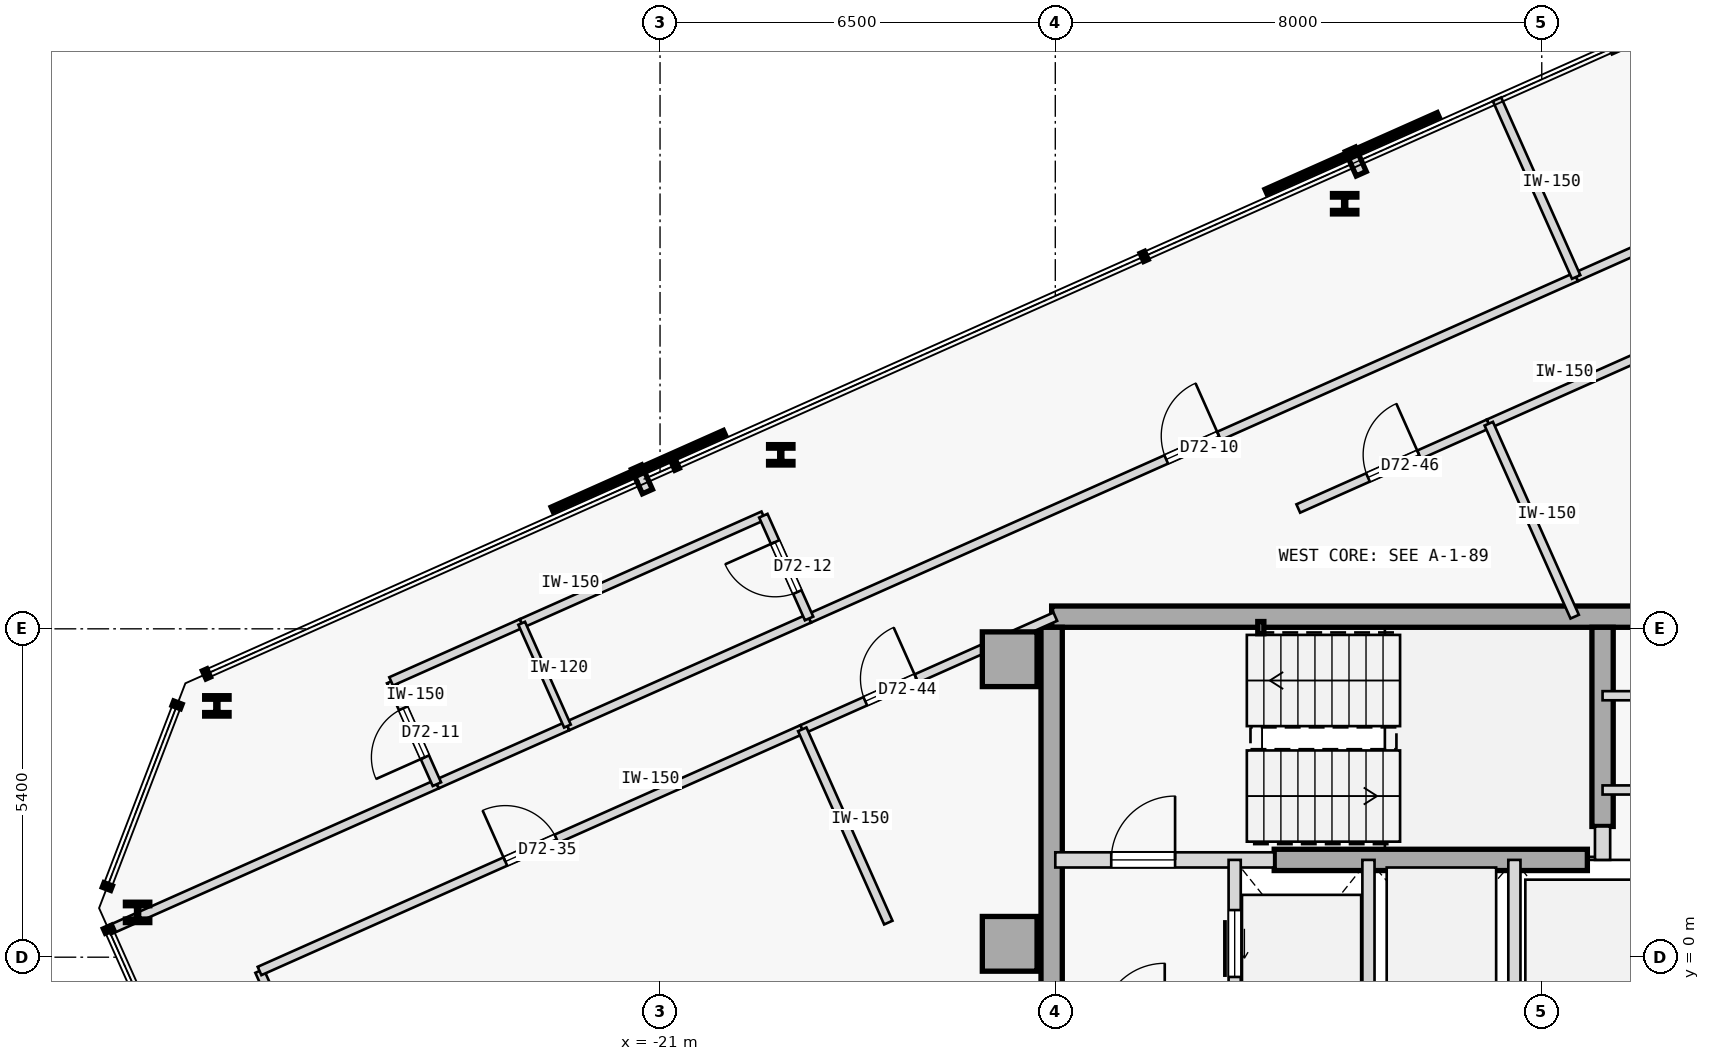
"""IFC4 building model, lengths in metres.
Left out: names, types, materials, properties, quantities, classifications, styles, units other than length and angle.
Written with IfcOpenShell. Run it as: python <this file> out.ifc"""

import sys

from ifc_helpers import new_model, si_unit, direction, frame, frame_2d, origin, origin_2d, place, context, subcontext, project, spatial, rectangle, hollow_rectangle, i_section, extrude, element, fill, save


model = new_model("IFC4")
c1 = context("Model", 3, precision=1e-05, world=origin(), true_north=direction((0.0, 1.0)))
c2 = subcontext(c1, "Body", "Model", "MODEL_VIEW")
j1 = project(units=[si_unit("LENGTHUNIT", "METRE"), si_unit("PLANEANGLEUNIT", "RADIAN")], contexts=[c1])
p1 = place(None, origin())
s1 = spatial("IfcSite", under=j1, at=p1, CompositionType="ELEMENT")
p2 = place(p1, origin())
s2 = spatial("IfcBuilding", under=s1, at=p2, CompositionType="ELEMENT")
p3 = place(p2, frame((0.0, 0.0, 268.9)))
s3 = spatial("IfcBuildingStorey", under=s2, at=p3, CompositionType="ELEMENT", Elevation=268.9)
for number, where, z_axis, x_axis in (
    (1, (-15.25, 4.9, 0.0), (0.0, 0.0, 1.0), (1.0, 0.0, 0.0)),
    (2, (-15.25, 0.22, 0.0), (0.0, 0.0, 1.0), (1.0, 0.0, 0.0)),
):
    element("IfcColumn", number, at=place(p3, frame(where, z_axis=z_axis, x_axis=x_axis)), inside=s3, PredefinedType="COLUMN", context=c2, shape_type="SweptSolid", body=[
        extrude(rectangle(XDim=0.9, YDim=0.9, at=origin_2d()), origin(), (0.0, 0.0, 1.0), 3.35),
    ])
p4 = place(p3, frame((-14.56, 5.6, 0.0), z_axis=(0.0, 0.0, 1.0), x_axis=(1.0, 0.0, 0.0)))
e3 = element("IfcWall", 3, at=p4, inside=s3, PredefinedType="SHEAR", context=c2, shape_type="SweptSolid", body=[
    extrude(rectangle(XDim=11.41, YDim=0.35, at=frame_2d((5.705, 0.0))), origin(), (0.0, 0.0, 1.0), 3.125),
])
p5 = place(p3, frame((-14.56, -5.425, 0.0), z_axis=(0.0, 0.0, 1.0), x_axis=(0.0, 1.0, 0.0)))
e4 = element("IfcWall", 4, at=p5, inside=s3, PredefinedType="SHEAR", context=c2, shape_type="SweptSolid", body=[
    extrude(rectangle(XDim=10.85, YDim=0.35, at=frame_2d((5.425, 0.0))), origin(), (0.0, 0.0, 1.0), 3.125),
])
p6 = place(p3, frame((-5.5, 2.15, 0.0), z_axis=(0.0, 0.0, 1.0), x_axis=(0.0, 1.0, 0.0)))
e5 = element("IfcWall", 5, at=p6, inside=s3, PredefinedType="SHEAR", context=c2, shape_type="SweptSolid", body=[
    extrude(rectangle(XDim=3.275, YDim=0.35, at=frame_2d((1.638, 0.0))), origin(), (0.0, 0.0, 1.0), 3.125),
])
p7 = place(p3, frame((-10.9, 1.6, 0.0), z_axis=(0.0, 0.0, 1.0), x_axis=(1.0, 0.0, 0.0)))
e6 = element("IfcWall", 6, at=p7, inside=s3, PredefinedType="SHEAR", context=c2, shape_type="SweptSolid", body=[
    extrude(rectangle(XDim=5.15, YDim=0.35, at=frame_2d((2.575, 0.0))), origin(), (0.0, 0.0, 1.0), 3.125),
])
p8 = place(p3, frame((-11.12, 5.42, 0.0), z_axis=(0.0, 0.0, 1.0), x_axis=(1.0, 0.0, 0.0)))
e7 = element("IfcColumn", 7, at=p8, inside=s3, PredefinedType="COLUMN", context=c2, shape_type="SweptSolid", body=[
    extrude(hollow_rectangle(XDim=0.1, YDim=0.2, WallThickness=0.008, at=origin_2d()), origin(), (0.0, 0.0, 1.0), 3.35),
])
for number, where, z_axis, x_axis in (
    (8, (-9.741, 12.39, 0.0), (0.0, 0.0, 1.0), (1.0, 0.0, 0.0)),
    (9, (-19.015, 8.262, 0.0), (0.0, 0.0, 1.0), (1.0, 0.0, 0.0)),
    (10, (-28.288, 4.133, 0.0), (0.0, 0.0, 1.0), (1.0, 0.0, 0.0)),
    (11, (-29.592, 0.737, 0.0), (0.0, 0.0, 1.0), (1.0, 0.0, 0.0)),
):
    element("IfcColumn", number, at=place(p3, frame(where, z_axis=z_axis, x_axis=x_axis)), inside=s3, PredefinedType="COLUMN", context=c2, shape_type="SweptSolid", body=[
        extrude(i_section(OverallWidth=0.401, OverallDepth=0.335, WebThickness=0.036, FlangeThickness=0.058, FilletRadius=0.015, at=origin_2d()), origin(), (0.0, 0.0, 1.0), 3.35),
    ])
p9 = place(p3, frame((-14.5, 1.6, 0.0), z_axis=(0.0, 0.0, 1.0), x_axis=(1.0, 0.0, 0.0)))
e12 = element("IfcWall", 12, at=p9, inside=s3, PredefinedType="STANDARD", context=c2, shape_type="SweptSolid", body=[
    extrude(rectangle(XDim=3.6, YDim=0.25, at=frame_2d((1.8, 0.0))), origin(), (0.0, 0.0, 1.0), 3.125),
])
p10 = place(p9, frame((0.92, 0.0, 0.0)))
e13 = element("IfcOpeningElement", 13, at=p10, cuts=e12, PredefinedType="OPENING", context=c2, shape_type="SweptSolid", body=[
    extrude(rectangle(XDim=1.05, YDim=2.15, at=frame_2d((0.525, 1.075))), frame((0.0, 0.135, 0.0), z_axis=(0.0, -1.0, 0.0), x_axis=(1.0, 0.0, 0.0)), (0.0, 0.0, 1.0), 0.27),
])
p11 = place(p3, frame((-5.5, 1.6, 0.0), z_axis=(0.0, 0.0, 1.0), x_axis=(0.0, 1.0, 0.0)))
e14 = element("IfcWall", 14, at=p11, inside=s3, PredefinedType="STANDARD", context=c2, shape_type="SweptSolid", body=[
    extrude(rectangle(XDim=0.55, YDim=0.25, at=frame_2d((0.275, 0.0))), origin(), (0.0, 0.0, 1.0), 3.125),
])
p12 = place(p3, frame((-11.55, -1.15, 0.0), z_axis=(0.0, 0.0, 1.0), x_axis=(0.0, 1.0, 0.0)))
e15 = element("IfcWall", 15, at=p12, inside=s3, PredefinedType="STANDARD", context=c2, shape_type="SweptSolid", body=[
    extrude(rectangle(XDim=2.75, YDim=0.2, at=frame_2d((1.375, 0.0))), origin(), (0.0, 0.0, 1.0), 3.125),
])
p13 = place(p12, frame((0.825, 0.0, 0.0)))
e16 = element("IfcOpeningElement", 16, at=p13, cuts=e15, PredefinedType="OPENING", context=c2, shape_type="SweptSolid", body=[
    extrude(rectangle(XDim=1.1, YDim=2.15, at=frame_2d((0.55, 1.075))), frame((0.0, 0.11, 0.0), z_axis=(0.0, -1.0, 0.0), x_axis=(1.0, 0.0, 0.0)), (0.0, 0.0, 1.0), 0.22),
])
for number, where, z_axis, x_axis in (
    (17, (-9.35, -1.15, 0.0), (0.0, 0.0, 1.0), (0.0, 1.0, 0.0)),
    (18, (-6.95, -1.15, 0.0), (0.0, 0.0, 1.0), (0.0, 1.0, 0.0)),
):
    element("IfcWall", number, at=place(p3, frame(where, z_axis=z_axis, x_axis=x_axis)), inside=s3, PredefinedType="STANDARD", context=c2, shape_type="SweptSolid", body=[
        extrude(rectangle(XDim=2.75, YDim=0.2, at=frame_2d((1.375, 0.0))), origin(), (0.0, 0.0, 1.0), 3.125),
    ])
for number, where, z_axis, x_axis in (
    (19, (-5.5, 4.3, 0.0), (0.0, 0.0, 1.0), (1.0, 0.0, 0.0)),
    (20, (-5.5, 2.75, 0.0), (0.0, 0.0, 1.0), (1.0, 0.0, 0.0)),
):
    element("IfcWall", number, at=place(p3, frame(where, z_axis=z_axis, x_axis=x_axis)), inside=s3, PredefinedType="PARTITIONING", context=c2, shape_type="SweptSolid", body=[
        extrude(rectangle(XDim=1.8, YDim=0.15, at=frame_2d((0.9, 0.0))), origin(), (0.0, 0.0, 1.0), 3.125),
    ])
p14 = place(p3, frame((-30.063, 0.444, 0.0), z_axis=(0.0, 0.0, 1.0), x_axis=(0.913545336501, 0.406736915165, 0.0)))
e21 = element("IfcWall", 21, at=p14, inside=s3, PredefinedType="PARTITIONING", context=c2, shape_type="SweptSolid", body=[
    extrude(rectangle(XDim=5.904, YDim=0.15, at=frame_2d((2.952, 0.0))), origin(), (0.0, 0.0, 1.0), 3.125),
])
p15 = place(p3, frame((-18.549, 5.57, 0.0), z_axis=(0.0, 0.0, 1.0), x_axis=(0.913545955058, 0.40673552586, 0.0)))
e22 = element("IfcWall", 22, at=p15, inside=s3, PredefinedType="PARTITIONING", context=c2, shape_type="SweptSolid", body=[
    extrude(rectangle(XDim=13.808, YDim=0.15, at=frame_2d((6.904, 0.0))), origin(), (0.0, 0.0, 1.0), 3.125),
])
p16 = place(p15, frame((6.429, 0.0, 0.0)))
e23 = element("IfcOpeningElement", 23, at=p16, cuts=e22, PredefinedType="OPENING", context=c2, shape_type="SweptSolid", body=[
    extrude(rectangle(XDim=0.95, YDim=2.15, at=frame_2d((0.475, 1.075))), frame((0.0, 0.085, 0.0), z_axis=(0.0, -1.0, 0.0), x_axis=(1.0, 0.0, 0.0)), (0.0, 0.0, 1.0), 0.17),
])
p17 = place(p3, frame((-24.67, 2.845, 0.0), z_axis=(0.0, 0.0, 1.0), x_axis=(0.913541436194, 0.406745675276, 0.0)))
e24 = element("IfcWall", 24, at=p17, inside=s3, PredefinedType="PARTITIONING", context=c2, shape_type="SweptSolid", body=[
    extrude(rectangle(XDim=2.35, YDim=0.15, at=frame_2d((1.175, 0.0))), origin(), (0.0, 0.0, 1.0), 3.125),
])
p18 = place(p3, frame((-22.523, 3.801, 0.0), z_axis=(0.0, 0.0, 1.0), x_axis=(0.913545193015, 0.406737237438, 0.0)))
e25 = element("IfcWall", 25, at=p18, inside=s3, PredefinedType="PARTITIONING", context=c2, shape_type="SweptSolid", body=[
    extrude(rectangle(XDim=4.35, YDim=0.15, at=frame_2d((2.175, 0.0))), origin(), (0.0, 0.0, 1.0), 3.125),
])
p19 = place(p3, frame((-5.935, 11.187, 0.0), z_axis=(0.0, 0.0, 1.0), x_axis=(0.91354851465, 0.406729776856, 0.0)))
e26 = element("IfcWall", 26, at=p19, inside=s3, PredefinedType="PARTITIONING", context=c2, shape_type="SweptSolid", body=[
    extrude(rectangle(XDim=6.703, YDim=0.15, at=frame_2d((3.352, 0.0))), origin(), (0.0, 0.0, 1.0), 3.125),
])
p20 = place(p3, frame((-24.54, -7.068, 0.0), z_axis=(0.0, 0.0, 1.0), x_axis=(-0.406758457302, 0.913535745011, 0.0)))
e27 = element("IfcWall", 27, at=p20, inside=s3, PredefinedType="PARTITIONING", context=c2, shape_type="SweptSolid", body=[
    extrude(rectangle(XDim=7.489, YDim=0.15, at=frame_2d((3.744, 0.0))), origin(), (0.0, 0.0, 1.0), 3.125),
])
p21 = place(p3, frame((-27.586, -0.227, 0.0), z_axis=(0.0, 0.0, 1.0), x_axis=(0.913542396088, 0.40674351937, 0.0)))
e28 = element("IfcWall", 28, at=p21, inside=s3, PredefinedType="PARTITIONING", context=c2, shape_type="SweptSolid", body=[
    extrude(rectangle(XDim=9.77, YDim=0.15, at=frame_2d((4.885, 0.0))), origin(), (0.0, 0.0, 1.0), 3.125),
])
p22 = place(p21, frame((4.425, 0.0, 0.0)))
e29 = element("IfcOpeningElement", 29, at=p22, cuts=e28, PredefinedType="OPENING", context=c2, shape_type="SweptSolid", body=[
    extrude(rectangle(XDim=0.92, YDim=2.15, at=frame_2d((0.46, 1.075))), frame((0.0, 0.085, 0.0), z_axis=(0.0, -1.0, 0.0), x_axis=(1.0, 0.0, 0.0)), (0.0, 0.0, 1.0), 0.17),
])
p23 = place(p3, frame((-18.661, 3.747, 0.0), z_axis=(0.0, 0.0, 1.0), x_axis=(0.913535055583, 0.40676000568, 0.0)))
e30 = element("IfcWall", 30, at=p23, inside=s3, PredefinedType="PARTITIONING", context=c2, shape_type="SweptSolid", body=[
    extrude(rectangle(XDim=4.555, YDim=0.15, at=frame_2d((2.277, 0.0))), origin(), (0.0, 0.0, 1.0), 3.125),
])
p24 = place(p23, frame((1.134, 0.0, 0.0)))
e31 = element("IfcOpeningElement", 31, at=p24, cuts=e30, PredefinedType="OPENING", context=c2, shape_type="SweptSolid", body=[
    extrude(rectangle(XDim=0.92, YDim=2.15, at=frame_2d((0.46, 1.075))), frame((0.0, 0.085, 0.0), z_axis=(0.0, -1.0, 0.0), x_axis=(1.0, 0.0, 0.0)), (0.0, 0.0, 1.0), 0.17),
])
p25 = place(p3, frame((-10.504, 7.379, 0.0), z_axis=(0.0, 0.0, 1.0), x_axis=(0.913526514415, 0.406779187596, 0.0)))
e32 = element("IfcWall", 32, at=p25, inside=s3, PredefinedType="PARTITIONING", context=c2, shape_type="SweptSolid", body=[
    extrude(rectangle(XDim=3.429, YDim=0.15, at=frame_2d((1.714, 0.0))), origin(), (0.0, 0.0, 1.0), 3.125),
])
p26 = place(p25, frame((1.254, 0.0, 0.0)))
e33 = element("IfcOpeningElement", 33, at=p26, cuts=e32, PredefinedType="OPENING", context=c2, shape_type="SweptSolid", body=[
    extrude(rectangle(XDim=0.92, YDim=2.15, at=frame_2d((0.46, 1.075))), frame((0.0, 0.085, 0.0), z_axis=(0.0, -1.0, 0.0), x_axis=(1.0, 0.0, 0.0)), (0.0, 0.0, 1.0), 0.17),
])
p27 = place(p3, frame((-7.372, 8.774, 0.0), z_axis=(0.0, 0.0, 1.0), x_axis=(0.913563383118, 0.406696379412, 0.0)))
e34 = element("IfcWall", 34, at=p27, inside=s3, PredefinedType="PARTITIONING", context=c2, shape_type="SweptSolid", body=[
    extrude(rectangle(XDim=4.019, YDim=0.15, at=frame_2d((2.01, 0.0))), origin(), (0.0, 0.0, 1.0), 3.125),
])
p28 = place(p3, frame((-24.67, 2.845, 0.0), z_axis=(0.0, 0.0, 1.0), x_axis=(-0.406701600856, 0.913561058639, 0.0)))
e35 = element("IfcWall", 35, at=p28, inside=s3, PredefinedType="PARTITIONING", context=c2, shape_type="SweptSolid", body=[
    extrude(rectangle(XDim=1.85, YDim=0.15, at=frame_2d((0.925, 0.0))), origin(), (0.0, 0.0, 1.0), 3.125),
])
p29 = place(p28, frame((0.485, 0.0, 0.0)))
e36 = element("IfcOpeningElement", 36, at=p29, cuts=e35, PredefinedType="OPENING", context=c2, shape_type="SweptSolid", body=[
    extrude(rectangle(XDim=0.88, YDim=2.15, at=frame_2d((0.44, 1.075))), frame((0.0, 0.085, 0.0), z_axis=(0.0, -1.0, 0.0), x_axis=(1.0, 0.0, 0.0)), (0.0, 0.0, 1.0), 0.17),
])
p30 = place(p3, frame((-25.422, 4.535, 0.0), z_axis=(0.0, 0.0, 1.0), x_axis=(0.913541436194, 0.406745675276, 0.0)))
e37 = element("IfcWall", 37, at=p30, inside=s3, PredefinedType="PARTITIONING", context=c2, shape_type="SweptSolid", body=[
    extrude(rectangle(XDim=2.35, YDim=0.15, at=frame_2d((1.175, 0.0))), origin(), (0.0, 0.0, 1.0), 3.125),
])
p31 = place(p3, frame((-23.275, 5.491, 0.0), z_axis=(0.0, 0.0, 1.0), x_axis=(0.913545193015, 0.406737237438, 0.0)))
e38 = element("IfcWall", 38, at=p31, inside=s3, PredefinedType="PARTITIONING", context=c2, shape_type="SweptSolid", body=[
    extrude(rectangle(XDim=4.35, YDim=0.15, at=frame_2d((2.175, 0.0))), origin(), (0.0, 0.0, 1.0), 3.125),
])
p32 = place(p3, frame((-18.549, 5.57, 0.0), z_axis=(0.0, 0.0, 1.0), x_axis=(-0.406701600856, 0.913561058639, 0.0)))
e39 = element("IfcWall", 39, at=p32, inside=s3, PredefinedType="PARTITIONING", context=c2, shape_type="SweptSolid", body=[
    extrude(rectangle(XDim=1.85, YDim=0.15, at=frame_2d((0.925, 0.0))), origin(), (0.0, 0.0, 1.0), 3.125),
])
p33 = place(p32, frame((0.475, 0.0, 0.0)))
e40 = element("IfcOpeningElement", 40, at=p33, cuts=e39, PredefinedType="OPENING", context=c2, shape_type="SweptSolid", body=[
    extrude(rectangle(XDim=0.9, YDim=2.15, at=frame_2d((0.45, 1.075))), frame((0.0, 0.085, 0.0), z_axis=(0.0, -1.0, 0.0), x_axis=(1.0, 0.0, 0.0)), (0.0, 0.0, 1.0), 0.17),
])
p34 = place(p3, frame((-5.935, 11.187, 0.0), z_axis=(0.0, 0.0, 1.0), x_axis=(-0.406733350739, 0.913546923478, 0.0)))
e41 = element("IfcWall", 41, at=p34, inside=s3, PredefinedType="PARTITIONING", context=c2, shape_type="SweptSolid", body=[
    extrude(rectangle(XDim=3.198, YDim=0.15, at=frame_2d((1.599, 0.0))), origin(), (0.0, 0.0, 1.0), 3.125),
])
p35 = place(p3, frame((-22.523, 3.801, 0.0), z_axis=(0.0, 0.0, 1.0), x_axis=(-0.406701600856, 0.913561058639, 0.0)))
e42 = element("IfcWall", 42, at=p35, inside=s3, PredefinedType="PARTITIONING", context=c2, shape_type="SweptSolid", body=[
    extrude(rectangle(XDim=1.85, YDim=0.12, at=frame_2d((0.925, 0.0))), origin(), (0.0, 0.0, 1.0), 3.125),
])
p36 = place(p3, frame((-17.246, 0.569, 0.0), z_axis=(0.0, 0.0, 1.0), x_axis=(-0.40673740295, 0.913545119324, 0.0)))
e43 = element("IfcWall", 43, at=p36, inside=s3, PredefinedType="PARTITIONING", context=c2, shape_type="SweptSolid", body=[
    extrude(rectangle(XDim=3.479, YDim=0.15, at=frame_2d((1.74, 0.0))), origin(), (0.0, 0.0, 1.0), 3.125),
])
p37 = place(p3, frame((-5.958, 5.6, 0.0), z_axis=(0.0, 0.0, 1.0), x_axis=(-0.406738231884, 0.913544750258, 0.0)))
e44 = element("IfcWall", 44, at=p37, inside=s3, PredefinedType="PARTITIONING", context=c2, shape_type="SweptSolid", body=[
    extrude(rectangle(XDim=3.474, YDim=0.15, at=frame_2d((1.737, 0.0))), origin(), (0.0, 0.0, 1.0), 3.125),
])
p38 = place(p10, origin())
e45 = element("IfcDoor", 45, at=p38, inside=s3, OperationType="SINGLE_SWING_RIGHT", PredefinedType="DOOR", context=c2, shape_type="SweptSolid", body=[
    extrude(rectangle(XDim=1.05, YDim=2.15, at=frame_2d((0.525, 1.075))), frame((0.0, 0.025, 0.0), z_axis=(0.0, -1.0, 0.0), x_axis=(1.0, 0.0, 0.0)), (0.0, 0.0, 1.0), 0.05),
])
fill(e13, e45)
p39 = place(p13, origin())
e46 = element("IfcDoor", 46, at=p39, inside=s3, OperationType="SLIDING_TO_RIGHT", PredefinedType="DOOR", context=c2, shape_type="SweptSolid", body=[
    extrude(rectangle(XDim=1.1, YDim=2.15, at=frame_2d((0.55, 1.075))), frame((0.0, 0.025, 0.0), z_axis=(0.0, -1.0, 0.0), x_axis=(1.0, 0.0, 0.0)), (0.0, 0.0, 1.0), 0.05),
])
fill(e16, e46)
p40 = place(p16, origin())
e47 = element("IfcDoor", 47, at=p40, inside=s3, OperationType="SINGLE_SWING_RIGHT", PredefinedType="DOOR", context=c2, shape_type="SweptSolid", body=[
    extrude(rectangle(XDim=0.95, YDim=2.15, at=frame_2d((0.475, 1.075))), frame((0.0, 0.025, 0.0), z_axis=(0.0, -1.0, 0.0), x_axis=(1.0, 0.0, 0.0)), (0.0, 0.0, 1.0), 0.05),
])
fill(e23, e47)
p41 = place(p29, origin())
e48 = element("IfcDoor", 48, at=p41, inside=s3, OperationType="SINGLE_SWING_LEFT", PredefinedType="DOOR", context=c2, shape_type="SweptSolid", body=[
    extrude(rectangle(XDim=0.88, YDim=2.15, at=frame_2d((0.44, 1.075))), frame((0.0, 0.025, 0.0), z_axis=(0.0, -1.0, 0.0), x_axis=(1.0, 0.0, 0.0)), (0.0, 0.0, 1.0), 0.05),
])
fill(e36, e48)
p42 = place(p33, origin())
e49 = element("IfcDoor", 49, at=p42, inside=s3, OperationType="SINGLE_SWING_RIGHT", PredefinedType="DOOR", context=c2, shape_type="SweptSolid", body=[
    extrude(rectangle(XDim=0.9, YDim=2.15, at=frame_2d((0.45, 1.075))), frame((0.0, 0.025, 0.0), z_axis=(0.0, -1.0, 0.0), x_axis=(1.0, 0.0, 0.0)), (0.0, 0.0, 1.0), 0.05),
])
fill(e40, e49)
p43 = place(p22, origin())
e50 = element("IfcDoor", 50, at=p43, inside=s3, OperationType="SINGLE_SWING_LEFT", PredefinedType="DOOR", context=c2, shape_type="SweptSolid", body=[
    extrude(rectangle(XDim=0.92, YDim=2.15, at=frame_2d((0.46, 1.075))), frame((0.0, 0.025, 0.0), z_axis=(0.0, -1.0, 0.0), x_axis=(1.0, 0.0, 0.0)), (0.0, 0.0, 1.0), 0.05),
])
fill(e29, e50)
p44 = place(p24, origin())
e51 = element("IfcDoor", 51, at=p44, inside=s3, OperationType="SINGLE_SWING_RIGHT", PredefinedType="DOOR", context=c2, shape_type="SweptSolid", body=[
    extrude(rectangle(XDim=0.92, YDim=2.15, at=frame_2d((0.46, 1.075))), frame((0.0, 0.025, 0.0), z_axis=(0.0, -1.0, 0.0), x_axis=(1.0, 0.0, 0.0)), (0.0, 0.0, 1.0), 0.05),
])
fill(e31, e51)
p45 = place(p26, origin())
e52 = element("IfcDoor", 52, at=p45, inside=s3, OperationType="SINGLE_SWING_RIGHT", PredefinedType="DOOR", context=c2, shape_type="SweptSolid", body=[
    extrude(rectangle(XDim=0.92, YDim=2.15, at=frame_2d((0.46, 1.075))), frame((0.0, 0.025, 0.0), z_axis=(0.0, -1.0, 0.0), x_axis=(1.0, 0.0, 0.0)), (0.0, 0.0, 1.0), 0.05),
])
fill(e33, e52)
save(model, sys.argv[1])
